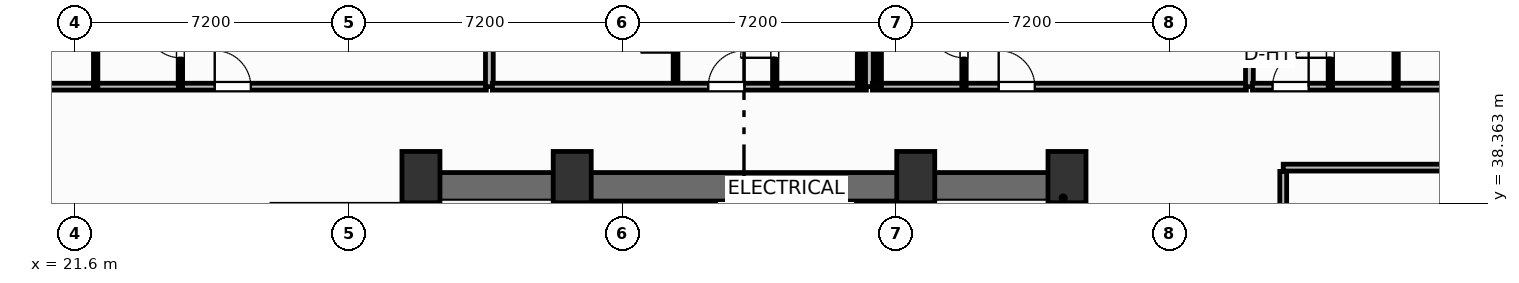
"""IFC4 building model, lengths in metres.
Left out: names, types, materials, properties, quantities, classifications, styles, units other than length and angle.
Written with IfcOpenShell. Run it as: python <this file> out.ifc"""

import sys

from ifc_helpers import new_model, si_unit, direction, frame, frame_2d, origin, origin_2d, place, context, subcontext, project, spatial, rectangle, extrude, element, fill, save


model = new_model("IFC4")
c1 = context("Model", 3, precision=1e-05, world=origin(), true_north=direction((0.0, 1.0)))
c2 = subcontext(c1, "Body", "Model", "MODEL_VIEW")
j1 = project(units=[si_unit("LENGTHUNIT", "METRE"), si_unit("PLANEANGLEUNIT", "RADIAN")], contexts=[c1])
p1 = place(None, origin())
s1 = spatial("IfcSite", under=j1, at=p1, CompositionType="ELEMENT")
p2 = place(p1, origin())
s2 = spatial("IfcBuilding", under=s1, at=p2, CompositionType="ELEMENT")
p3 = place(p2, frame((0.0, 0.0, 121.7)))
s3 = spatial("IfcBuildingStorey", under=s2, at=p3, CompositionType="ELEMENT", Elevation=121.7)
for number, where, z_axis, x_axis in (
    (1, (30.7, 39.05, 0.0), (0.0, 0.0, 1.0), (1.0, 0.0, 0.0)),
    (2, (34.68, 39.05, 0.0), (0.0, 0.0, 1.0), (1.0, 0.0, 0.0)),
    (3, (43.72, 39.05, 0.0), (0.0, 0.0, 1.0), (1.0, 0.0, 0.0)),
    (4, (47.7, 39.05, 0.0), (0.0, 0.0, 1.0), (1.0, 0.0, 0.0)),
):
    element("IfcColumn", number, at=place(p3, frame(where, z_axis=z_axis, x_axis=x_axis)), inside=s3, PredefinedType="COLUMN", context=c2, shape_type="SweptSolid", body=[
        extrude(rectangle(XDim=1.0, YDim=1.35, at=origin_2d()), origin(), (0.0, 0.0, 1.0), 3.7),
    ])
p4 = place(p3, frame((30.38, 38.795, 0.0), z_axis=(0.0, 0.0, 1.0), x_axis=(1.0, 0.0, 0.0)))
e5 = element("IfcWall", 5, at=p4, inside=s3, PredefinedType="SHEAR", context=c2, shape_type="SweptSolid", body=[
    extrude(rectangle(XDim=17.64, YDim=0.75, at=frame_2d((8.82, 0.0))), origin(), (0.0, 0.0, 1.0), 3.45),
])
for number, where, z_axis, x_axis in (
    (6, (30.755, 29.2, 0.0), (0.0, 0.0, 1.0), (0.0, 1.0, 0.0)),
    (7, (47.645, 29.2, 0.0), (0.0, 0.0, 1.0), (0.0, 1.0, 0.0)),
):
    element("IfcWall", number, at=place(p3, frame(where, z_axis=z_axis, x_axis=x_axis)), inside=s3, PredefinedType="SHEAR", context=c2, shape_type="SweptSolid", body=[
        extrude(rectangle(XDim=9.22, YDim=0.75, at=frame_2d((4.61, 0.0))), origin(), (0.0, 0.0, 1.0), 3.45),
    ])
p5 = place(p3, frame((34.64, 29.2, 0.0), z_axis=(0.0, 0.0, 1.0), x_axis=(0.0, 1.0, 0.0)))
e8 = element("IfcWall", 8, at=p5, inside=s3, PredefinedType="SHEAR", context=c2, shape_type="SweptSolid", body=[
    extrude(rectangle(XDim=9.22, YDim=0.25, at=frame_2d((4.61, 0.0))), origin(), (0.0, 0.0, 1.0), 3.45),
])
p6 = place(p5, frame((0.65, 0.0, 0.0)))
e9 = element("IfcOpeningElement", 9, at=p6, cuts=e8, PredefinedType="OPENING", context=c2, shape_type="SweptSolid", body=[
    extrude(rectangle(XDim=1.05, YDim=2.15, at=frame_2d((0.525, 1.075))), frame((0.0, 0.135, 0.0), z_axis=(0.0, -1.0, 0.0), x_axis=(1.0, 0.0, 0.0)), (0.0, 0.0, 1.0), 0.27),
])
p7 = place(p3, frame((43.76, 29.2, 0.0), z_axis=(0.0, 0.0, 1.0), x_axis=(0.0, 1.0, 0.0)))
e10 = element("IfcWall", 10, at=p7, inside=s3, PredefinedType="SHEAR", context=c2, shape_type="SweptSolid", body=[
    extrude(rectangle(XDim=9.22, YDim=0.25, at=frame_2d((4.61, 0.0))), origin(), (0.0, 0.0, 1.0), 3.45),
])
p8 = place(p7, frame((0.65, 0.0, 0.0)))
e11 = element("IfcOpeningElement", 11, at=p8, cuts=e10, PredefinedType="OPENING", context=c2, shape_type="SweptSolid", body=[
    extrude(rectangle(XDim=1.05, YDim=2.15, at=frame_2d((0.525, 1.075))), frame((0.0, 0.135, 0.0), z_axis=(0.0, -1.0, 0.0), x_axis=(1.0, 0.0, 0.0)), (0.0, 0.0, 1.0), 0.27),
])
p9 = place(p3, frame((3.864, 41.43, 0.0), z_axis=(0.0, 0.0, 1.0), x_axis=(1.0, 0.0, 0.0)))
e12 = element("IfcWall", 12, at=p9, inside=s3, PredefinedType="PARTITIONING", context=c2, shape_type="SweptSolid", body=[
    extrude(rectangle(XDim=28.556, YDim=0.18, at=frame_2d((14.278, 0.0))), origin(), (0.0, 0.0, 1.0), 3.45),
])
p10 = place(p9, frame((21.409, 0.0, 0.0)))
e13 = element("IfcOpeningElement", 13, at=p10, cuts=e12, PredefinedType="OPENING", context=c2, shape_type="SweptSolid", body=[
    extrude(rectangle(XDim=0.95, YDim=2.15, at=frame_2d((0.475, 1.075))), frame((0.0, 0.1, 0.0), z_axis=(0.0, -1.0, 0.0), x_axis=(1.0, 0.0, 0.0)), (0.0, 0.0, 1.0), 0.2),
])
p11 = place(p3, frame((24.37, 41.43, 0.0), z_axis=(0.0, 0.0, 1.0), x_axis=(0.0, 1.0, 0.0)))
e14 = element("IfcWall", 14, at=p11, inside=s3, PredefinedType="PARTITIONING", context=c2, shape_type="SweptSolid", body=[
    extrude(rectangle(XDim=2.52, YDim=0.115, at=frame_2d((1.26, 0.0))), origin(), (0.0, 0.0, 1.0), 3.45),
])
p12 = place(p11, frame((0.76, 0.0, 0.0)))
e15 = element("IfcOpeningElement", 15, at=p12, cuts=e14, PredefinedType="OPENING", context=c2, shape_type="SweptSolid", body=[
    extrude(rectangle(XDim=0.9, YDim=2.05, at=frame_2d((0.45, 1.025))), frame((0.0, 0.067, 0.0), z_axis=(0.0, -1.0, 0.0), x_axis=(1.0, 0.0, 0.0)), (0.0, 0.0, 1.0), 0.135),
])
p13 = place(p3, frame((22.14, 41.43, 0.0), z_axis=(0.0, 0.0, 1.0), x_axis=(0.0, 1.0, 0.0)))
e16 = element("IfcWall", 16, at=p13, inside=s3, PredefinedType="PARTITIONING", context=c2, shape_type="SweptSolid", body=[
    extrude(rectangle(XDim=2.52, YDim=0.115, at=frame_2d((1.26, 0.0))), origin(), (0.0, 0.0, 1.0), 3.45),
])
p14 = place(p3, frame((32.5, 41.43, 0.0), z_axis=(0.0, 0.0, 1.0), x_axis=(0.0, 1.0, 0.0)))
e17 = element("IfcWall", 17, at=p14, inside=s3, PredefinedType="PARTITIONING", context=c2, shape_type="SweptSolid", body=[
    extrude(rectangle(XDim=5.997, YDim=0.205, at=frame_2d((2.999, 0.0))), origin(), (0.0, 0.0, 1.0), 2.662),
])
p15 = place(p3, frame((37.4, 41.43, 0.0), z_axis=(0.0, 0.0, 1.0), x_axis=(0.0, 1.0, 0.0)))
e18 = element("IfcWall", 18, at=p15, inside=s3, PredefinedType="PARTITIONING", context=c2, shape_type="SweptSolid", body=[
    extrude(rectangle(XDim=5.403, YDim=0.125, at=frame_2d((2.702, 0.0))), origin(), (0.0, 0.0, 1.0), 3.45),
])
p16 = place(p15, frame((0.897, 0.0, 0.0)))
e19 = element("IfcOpeningElement", 19, at=p16, cuts=e18, PredefinedType="OPENING", context=c2, shape_type="SweptSolid", body=[
    extrude(rectangle(XDim=0.92, YDim=2.05, at=frame_2d((0.46, 1.025))), frame((0.0, 0.073, 0.0), z_axis=(0.0, -1.0, 0.0), x_axis=(1.0, 0.0, 0.0)), (0.0, 0.0, 1.0), 0.145),
])
p17 = place(p3, frame((32.58, 41.43, 0.0), z_axis=(0.0, 0.0, 1.0), x_axis=(1.0, 0.0, 0.0)))
e20 = element("IfcWall", 20, at=p17, inside=s3, PredefinedType="PARTITIONING", context=c2, shape_type="SweptSolid", body=[
    extrude(rectangle(XDim=9.84, YDim=0.18, at=frame_2d((4.92, 0.0))), origin(), (0.0, 0.0, 1.0), 3.45),
])
p18 = place(p17, frame((5.68, 0.0, 0.0)))
e21 = element("IfcOpeningElement", 21, at=p18, cuts=e20, PredefinedType="OPENING", context=c2, shape_type="SweptSolid", body=[
    extrude(rectangle(XDim=0.95, YDim=2.15, at=frame_2d((0.475, 1.075))), frame((0.0, 0.1, 0.0), z_axis=(0.0, -1.0, 0.0), x_axis=(1.0, 0.0, 0.0)), (0.0, 0.0, 1.0), 0.2),
])
p19 = place(p3, frame((40.01, 41.43, 0.0), z_axis=(0.0, 0.0, 1.0), x_axis=(0.0, 1.0, 0.0)))
e22 = element("IfcWall", 22, at=p19, inside=s3, PredefinedType="PARTITIONING", context=c2, shape_type="SweptSolid", body=[
    extrude(rectangle(XDim=2.52, YDim=0.115, at=frame_2d((1.26, 0.0))), origin(), (0.0, 0.0, 1.0), 3.45),
])
p20 = place(p19, frame((0.76, 0.0, 0.0)))
e23 = element("IfcOpeningElement", 23, at=p20, cuts=e22, PredefinedType="OPENING", context=c2, shape_type="SweptSolid", body=[
    extrude(rectangle(XDim=0.9, YDim=2.05, at=frame_2d((0.45, 1.025))), frame((0.0, 0.067, 0.0), z_axis=(0.0, -1.0, 0.0), x_axis=(1.0, 0.0, 0.0)), (0.0, 0.0, 1.0), 0.135),
])
p21 = place(p3, frame((42.24, 41.43, 0.0), z_axis=(0.0, 0.0, 1.0), x_axis=(0.0, 1.0, 0.0)))
e24 = element("IfcWall", 24, at=p21, inside=s3, PredefinedType="PARTITIONING", context=c2, shape_type="SweptSolid", body=[
    extrude(rectangle(XDim=2.52, YDim=0.115, at=frame_2d((1.26, 0.0))), origin(), (0.0, 0.0, 1.0), 2.662),
])
p22 = place(p3, frame((42.5, 41.43, 0.0), z_axis=(0.0, 0.0, 1.0), x_axis=(0.0, 1.0, 0.0)))
e25 = element("IfcWall", 25, at=p22, inside=s3, PredefinedType="PARTITIONING", context=c2, shape_type="SweptSolid", body=[
    extrude(rectangle(XDim=6.9, YDim=0.205, at=frame_2d((3.45, 0.0))), origin(), (0.0, 0.0, 1.0), 2.662),
])
p23 = place(p3, frame((42.58, 41.43, 0.0), z_axis=(0.0, 0.0, 1.0), x_axis=(1.0, 0.0, 0.0)))
e26 = element("IfcWall", 26, at=p23, inside=s3, PredefinedType="PARTITIONING", context=c2, shape_type="SweptSolid", body=[
    extrude(rectangle(XDim=9.84, YDim=0.18, at=frame_2d((4.92, 0.0))), origin(), (0.0, 0.0, 1.0), 3.45),
])
p24 = place(p23, frame((3.323, 0.0, 0.0)))
e27 = element("IfcOpeningElement", 27, at=p24, cuts=e26, PredefinedType="OPENING", context=c2, shape_type="SweptSolid", body=[
    extrude(rectangle(XDim=0.95, YDim=2.15, at=frame_2d((0.475, 1.075))), frame((0.0, 0.1, 0.0), z_axis=(0.0, -1.0, 0.0), x_axis=(1.0, 0.0, 0.0)), (0.0, 0.0, 1.0), 0.2),
])
p25 = place(p3, frame((44.99, 41.43, 0.0), z_axis=(0.0, 0.0, 1.0), x_axis=(0.0, 1.0, 0.0)))
e28 = element("IfcWall", 28, at=p25, inside=s3, PredefinedType="PARTITIONING", context=c2, shape_type="SweptSolid", body=[
    extrude(rectangle(XDim=2.52, YDim=0.115, at=frame_2d((1.26, 0.0))), origin(), (0.0, 0.0, 1.0), 3.45),
])
p26 = place(p25, frame((0.76, 0.0, 0.0)))
e29 = element("IfcOpeningElement", 29, at=p26, cuts=e28, PredefinedType="OPENING", context=c2, shape_type="SweptSolid", body=[
    extrude(rectangle(XDim=0.9, YDim=2.05, at=frame_2d((0.45, 1.025))), frame((0.0, 0.067, 0.0), z_axis=(0.0, -1.0, 0.0), x_axis=(1.0, 0.0, 0.0)), (0.0, 0.0, 1.0), 0.135),
])
p27 = place(p3, frame((42.76, 41.43, 0.0), z_axis=(0.0, 0.0, 1.0), x_axis=(0.0, 1.0, 0.0)))
e30 = element("IfcWall", 30, at=p27, inside=s3, PredefinedType="PARTITIONING", context=c2, shape_type="SweptSolid", body=[
    extrude(rectangle(XDim=2.52, YDim=0.115, at=frame_2d((1.26, 0.0))), origin(), (0.0, 0.0, 1.0), 2.662),
])
p28 = place(p3, frame((52.5, 41.43, 0.0), z_axis=(0.0, 0.0, 1.0), x_axis=(0.0, 1.0, 0.0)))
e31 = element("IfcWall", 31, at=p28, inside=s3, PredefinedType="PARTITIONING", context=c2, shape_type="SweptSolid", body=[
    extrude(rectangle(XDim=5.688, YDim=0.205, at=frame_2d((2.844, 0.0))), origin(), (0.0, 0.0, 1.0), 3.45),
])
p29 = place(p3, frame((52.58, 41.43, 0.0), z_axis=(0.0, 0.0, 1.0), x_axis=(1.0, 0.0, 0.0)))
e32 = element("IfcWall", 32, at=p29, inside=s3, PredefinedType="PARTITIONING", context=c2, shape_type="SweptSolid", body=[
    extrude(rectangle(XDim=21.74, YDim=0.18, at=frame_2d((10.87, 0.0))), origin(), (0.0, 0.0, 1.0), 3.45),
])
p30 = place(p29, frame((0.529, 0.0, 0.0)))
e33 = element("IfcOpeningElement", 33, at=p30, cuts=e32, PredefinedType="OPENING", context=c2, shape_type="SweptSolid", body=[
    extrude(rectangle(XDim=0.95, YDim=2.15, at=frame_2d((0.475, 1.075))), frame((0.0, 0.1, 0.0), z_axis=(0.0, -1.0, 0.0), x_axis=(1.0, 0.0, 0.0)), (0.0, 0.0, 1.0), 0.2),
])
p31 = place(p3, frame((54.63, 41.43, 0.0), z_axis=(0.0, 0.0, 1.0), x_axis=(0.0, 1.0, 0.0)))
e34 = element("IfcWall", 34, at=p31, inside=s3, PredefinedType="PARTITIONING", context=c2, shape_type="SweptSolid", body=[
    extrude(rectangle(XDim=2.52, YDim=0.115, at=frame_2d((1.26, 0.0))), origin(), (0.0, 0.0, 1.0), 3.45),
])
p32 = place(p31, frame((0.76, 0.0, 0.0)))
e35 = element("IfcOpeningElement", 35, at=p32, cuts=e34, PredefinedType="OPENING", context=c2, shape_type="SweptSolid", body=[
    extrude(rectangle(XDim=0.9, YDim=2.05, at=frame_2d((0.45, 1.025))), frame((0.0, 0.067, 0.0), z_axis=(0.0, -1.0, 0.0), x_axis=(1.0, 0.0, 0.0)), (0.0, 0.0, 1.0), 0.135),
])
p33 = place(p3, frame((56.36, 41.43, 0.0), z_axis=(0.0, 0.0, 1.0), x_axis=(0.0, 1.0, 0.0)))
e36 = element("IfcWall", 36, at=p33, inside=s3, PredefinedType="PARTITIONING", context=c2, shape_type="SweptSolid", body=[
    extrude(rectangle(XDim=2.52, YDim=0.115, at=frame_2d((1.26, 0.0))), origin(), (0.0, 0.0, 1.0), 3.45),
])
p34 = place(p3, frame((53.39, 27.53, 0.0), z_axis=(0.0, 0.0, 1.0), x_axis=(0.0, 1.0, 0.0)))
e37 = element("IfcWall", 37, at=p34, inside=s3, PredefinedType="PARTITIONING", context=c2, shape_type="SweptSolid", body=[
    extrude(rectangle(XDim=11.67, YDim=0.18, at=frame_2d((5.835, 0.0))), origin(), (0.0, 0.0, 1.0), 3.45),
])
p35 = place(p34, frame((5.8, 0.0, 0.0)))
e38 = element("IfcOpeningElement", 38, at=p35, cuts=e37, PredefinedType="OPENING", context=c2, shape_type="SweptSolid", body=[
    extrude(rectangle(XDim=0.92, YDim=2.05, at=frame_2d((0.46, 1.025))), frame((0.0, 0.1, 0.0), z_axis=(0.0, -1.0, 0.0), x_axis=(1.0, 0.0, 0.0)), (0.0, 0.0, 1.0), 0.2),
])
p36 = place(p3, frame((53.39, 39.3, 0.0), z_axis=(0.0, 0.0, 1.0), x_axis=(1.0, 0.0, 0.0)))
e39 = element("IfcWall", 39, at=p36, inside=s3, PredefinedType="PARTITIONING", context=c2, shape_type="SweptSolid", body=[
    extrude(rectangle(XDim=24.74, YDim=0.18, at=frame_2d((12.37, 0.0))), origin(), (0.0, 0.0, 1.0), 3.45),
])
p37 = place(p10, origin())
e40 = element("IfcDoor", 40, at=p37, inside=s3, OperationType="SINGLE_SWING_LEFT", PredefinedType="DOOR", context=c2, shape_type="SweptSolid", body=[
    extrude(rectangle(XDim=0.95, YDim=2.15, at=frame_2d((0.475, 1.075))), frame((0.0, 0.025, 0.0), z_axis=(0.0, -1.0, 0.0), x_axis=(1.0, 0.0, 0.0)), (0.0, 0.0, 1.0), 0.05),
])
fill(e13, e40)
p38 = place(p12, origin())
e41 = element("IfcDoor", 41, at=p38, inside=s3, OperationType="SINGLE_SWING_RIGHT", PredefinedType="DOOR", context=c2, shape_type="SweptSolid", body=[
    extrude(rectangle(XDim=0.9, YDim=2.05, at=frame_2d((0.45, 1.025))), frame((0.0, 0.025, 0.0), z_axis=(0.0, -1.0, 0.0), x_axis=(1.0, 0.0, 0.0)), (0.0, 0.0, 1.0), 0.05),
])
fill(e15, e41)
p39 = place(p16, origin())
e42 = element("IfcDoor", 42, at=p39, inside=s3, OperationType="SINGLE_SWING_LEFT", PredefinedType="DOOR", context=c2, shape_type="SweptSolid", body=[
    extrude(rectangle(XDim=0.92, YDim=2.05, at=frame_2d((0.46, 1.025))), frame((0.0, 0.025, 0.0), z_axis=(0.0, -1.0, 0.0), x_axis=(1.0, 0.0, 0.0)), (0.0, 0.0, 1.0), 0.05),
])
fill(e19, e42)
p40 = place(p18, origin())
e43 = element("IfcDoor", 43, at=p40, inside=s3, OperationType="SINGLE_SWING_RIGHT", PredefinedType="DOOR", context=c2, shape_type="SweptSolid", body=[
    extrude(rectangle(XDim=0.95, YDim=2.15, at=frame_2d((0.475, 1.075))), frame((0.0, 0.025, 0.0), z_axis=(0.0, -1.0, 0.0), x_axis=(1.0, 0.0, 0.0)), (0.0, 0.0, 1.0), 0.05),
])
fill(e21, e43)
p41 = place(p20, origin())
e44 = element("IfcDoor", 44, at=p41, inside=s3, OperationType="SINGLE_SWING_LEFT", PredefinedType="DOOR", context=c2, shape_type="SweptSolid", body=[
    extrude(rectangle(XDim=0.9, YDim=2.05, at=frame_2d((0.45, 1.025))), frame((0.0, 0.025, 0.0), z_axis=(0.0, -1.0, 0.0), x_axis=(1.0, 0.0, 0.0)), (0.0, 0.0, 1.0), 0.05),
])
fill(e23, e44)
p42 = place(p24, origin())
e45 = element("IfcDoor", 45, at=p42, inside=s3, OperationType="SINGLE_SWING_LEFT", PredefinedType="DOOR", context=c2, shape_type="SweptSolid", body=[
    extrude(rectangle(XDim=0.95, YDim=2.15, at=frame_2d((0.475, 1.075))), frame((0.0, 0.025, 0.0), z_axis=(0.0, -1.0, 0.0), x_axis=(1.0, 0.0, 0.0)), (0.0, 0.0, 1.0), 0.05),
])
fill(e27, e45)
p43 = place(p26, origin())
e46 = element("IfcDoor", 46, at=p43, inside=s3, OperationType="SINGLE_SWING_RIGHT", PredefinedType="DOOR", context=c2, shape_type="SweptSolid", body=[
    extrude(rectangle(XDim=0.9, YDim=2.05, at=frame_2d((0.45, 1.025))), frame((0.0, 0.025, 0.0), z_axis=(0.0, -1.0, 0.0), x_axis=(1.0, 0.0, 0.0)), (0.0, 0.0, 1.0), 0.05),
])
fill(e29, e46)
p44 = place(p30, origin())
e47 = element("IfcDoor", 47, at=p44, inside=s3, OperationType="SINGLE_SWING_RIGHT", PredefinedType="DOOR", context=c2, shape_type="SweptSolid", body=[
    extrude(rectangle(XDim=0.95, YDim=2.15, at=frame_2d((0.475, 1.075))), frame((0.0, 0.025, 0.0), z_axis=(0.0, -1.0, 0.0), x_axis=(1.0, 0.0, 0.0)), (0.0, 0.0, 1.0), 0.05),
])
fill(e33, e47)
p45 = place(p32, origin())
e48 = element("IfcDoor", 48, at=p45, inside=s3, OperationType="SINGLE_SWING_LEFT", PredefinedType="DOOR", context=c2, shape_type="SweptSolid", body=[
    extrude(rectangle(XDim=0.9, YDim=2.05, at=frame_2d((0.45, 1.025))), frame((0.0, 0.025, 0.0), z_axis=(0.0, -1.0, 0.0), x_axis=(1.0, 0.0, 0.0)), (0.0, 0.0, 1.0), 0.05),
])
fill(e35, e48)
save(model, sys.argv[1])
